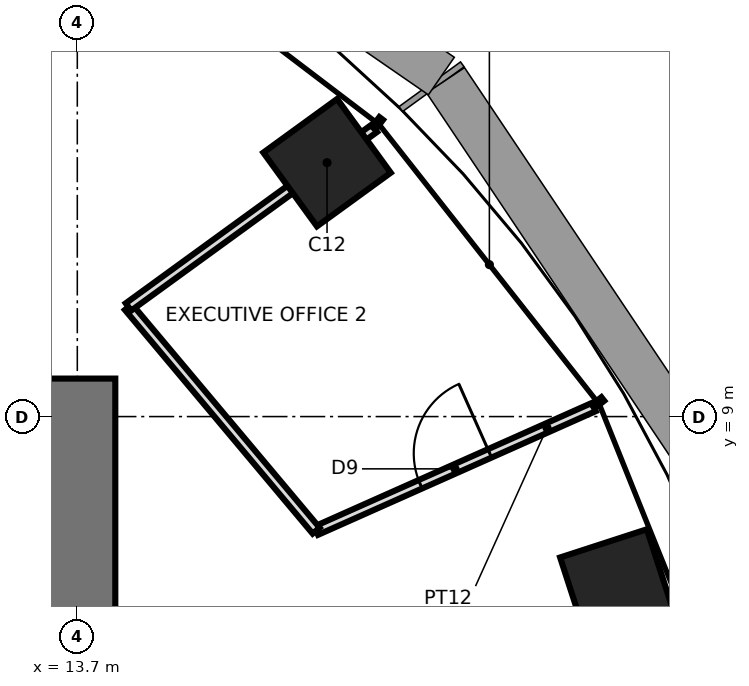
"""IFC4 building model, lengths in metres.
Left out: names, types, materials, properties, quantities, classifications, styles, units other than length and angle.
Written with IfcOpenShell. Run it as: python <this file> out.ifc"""

import sys

from ifc_helpers import new_model, si_unit, direction, frame, frame_2d, origin, origin_2d, place, context, subcontext, project, spatial, rectangle, extrude, element, fill, save


model = new_model("IFC4")
c1 = context("Model", 3, precision=1e-05, world=origin(), true_north=direction((0.0, 1.0)))
c2 = subcontext(c1, "Body", "Model", "MODEL_VIEW")
j1 = project(units=[si_unit("LENGTHUNIT", "METRE"), si_unit("PLANEANGLEUNIT", "RADIAN")], contexts=[c1])
p1 = place(None, origin())
s1 = spatial("IfcSite", under=j1, at=p1, CompositionType="ELEMENT")
p2 = place(p1, origin())
s2 = spatial("IfcBuilding", under=s1, at=p2, CompositionType="ELEMENT")
p3 = place(p2, frame((0.0, 0.0, 268.6)))
s3 = spatial("IfcBuildingStorey", under=s2, at=p3, CompositionType="ELEMENT", Elevation=268.6)
for number, where, z_axis, x_axis in (
    (1, (20.808, 6.761, 0.0), (0.0, 0.0, 1.0), (0.951, 0.309, 0.0)),
    (2, (16.986, 12.341, 0.0), (0.0, 0.0, 1.0), (0.809, 0.588, 0.0)),
):
    element("IfcColumn", number, at=place(p3, frame(where, z_axis=z_axis, x_axis=x_axis)), inside=s3, PredefinedType="COLUMN", context=c2, shape_type="SweptSolid", body=[
        extrude(rectangle(XDim=1.2, YDim=1.2, at=origin_2d()), origin(), (0.0, 0.0, 1.0), 4.2),
    ])
p4 = place(p3, frame((13.7, -9.5, 0.0), z_axis=(0.0, 0.0, 1.0), x_axis=(0.0, 1.0, 0.0)))
e3 = element("IfcWall", 3, at=p4, inside=s3, PredefinedType="SHEAR", context=c2, shape_type="SweptSolid", body=[
    extrude(rectangle(XDim=19.0, YDim=1.0, at=frame_2d((9.5, 0.0))), origin(), (0.0, 0.0, 1.0), 4.2),
])
p5 = place(p4, frame((8.6, 0.0, 0.0)))
e4 = element("IfcOpeningElement", 4, at=p5, cuts=e3, PredefinedType="OPENING", context=c2, shape_type="SweptSolid", body=[
    extrude(rectangle(XDim=1.8, YDim=2.4, at=frame_2d((0.9, 1.2))), frame((0.0, 0.51, 0.0), z_axis=(0.0, -1.0, 0.0), x_axis=(1.0, 0.0, 0.0)), (0.0, 0.0, 1.0), 1.02),
])
p6 = place(p3, frame((16.842, 7.499, 0.0), z_axis=(0.0, 0.0, 1.0), x_axis=(0.913549606868, 0.406727323635, 0.0)))
e5 = element("IfcWall", 5, at=p6, inside=s3, PredefinedType="PARTITIONING", context=c2, shape_type="SweptSolid", body=[
    extrude(rectangle(XDim=4.0, YDim=0.12, at=frame_2d((2.0, 0.0))), origin(), (0.0, 0.0, 1.0), 4.04),
])
p7 = place(p6, frame((1.5, 0.0, 0.0)))
e6 = element("IfcOpeningElement", 6, at=p7, cuts=e5, PredefinedType="OPENING", context=c2, shape_type="SweptSolid", body=[
    extrude(rectangle(XDim=1.0, YDim=2.4, at=frame_2d((0.5, 1.2))), frame((0.0, 0.07, 0.0), z_axis=(0.0, -1.0, 0.0), x_axis=(1.0, 0.0, 0.0)), (0.0, 0.0, 1.0), 0.14),
])
p8 = place(p3, frame((14.373, 10.442, 0.0), z_axis=(0.0, 0.0, 1.0), x_axis=(0.642749419025, -0.766076487267, 0.0)))
e7 = element("IfcWall", 7, at=p8, inside=s3, PredefinedType="PARTITIONING", context=c2, shape_type="SweptSolid", body=[
    extrude(rectangle(XDim=3.843, YDim=0.12, at=frame_2d((1.921, 0.0))), origin(), (0.0, 0.0, 1.0), 4.04),
])
p9 = place(p3, frame((17.609, 12.793, 0.0), z_axis=(0.0, 0.0, 1.0), x_axis=(-0.809026317077, -0.587772420479, 0.0)))
e8 = element("IfcWall", 8, at=p9, inside=s3, PredefinedType="PARTITIONING", context=c2, shape_type="SweptSolid", body=[
    extrude(rectangle(XDim=4.0, YDim=0.12, at=frame_2d((2.0, 0.0))), origin(), (0.0, 0.0, 1.0), 3.24),
])
p10 = place(p7, origin())
e9 = element("IfcDoor", 9, at=p10, inside=s3, OperationType="SINGLE_SWING_RIGHT", PredefinedType="DOOR", context=c2, shape_type="SweptSolid", body=[
    extrude(rectangle(XDim=1.0, YDim=2.4, at=frame_2d((0.5, 1.2))), frame((0.0, 0.025, 0.0), z_axis=(0.0, -1.0, 0.0), x_axis=(1.0, 0.0, 0.0)), (0.0, 0.0, 1.0), 0.05),
])
fill(e6, e9)
save(model, sys.argv[1])
